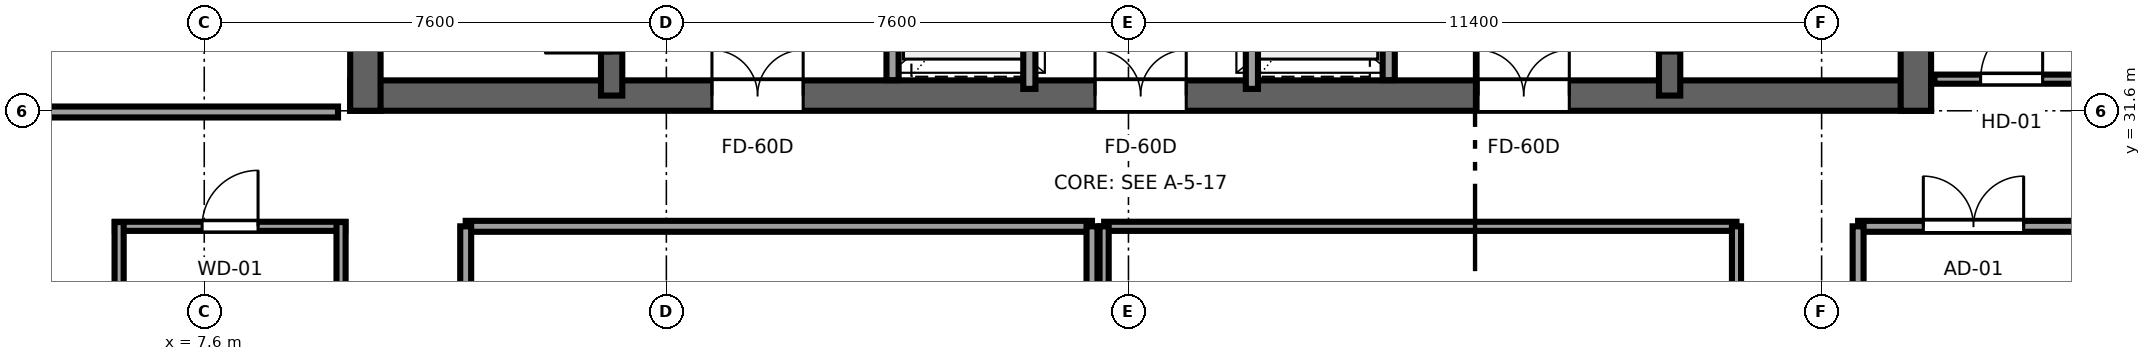
"""IFC4 building model, lengths in metres.
Left out: names, types, materials, properties, quantities, classifications, styles, units other than length and angle.
Written with IfcOpenShell. Run it as: python <this file> out.ifc"""

import sys

from ifc_helpers import new_model, si_unit, direction, frame, frame_2d, origin, place, context, subcontext, project, spatial, rectangle, extrude, source, transform, mapped, element, fill, save


model = new_model("IFC4")
c1 = context("Model", 3, precision=1e-05, world=origin(), true_north=direction((0.0, 1.0)))
c2 = subcontext(c1, "Body", "Model", "MODEL_VIEW")
j1 = project(units=[si_unit("LENGTHUNIT", "METRE"), si_unit("PLANEANGLEUNIT", "RADIAN")], contexts=[c1])
p1 = place(None, origin())
s1 = spatial("IfcSite", under=j1, at=p1, CompositionType="ELEMENT")
p2 = place(p1, origin())
s2 = spatial("IfcBuilding", under=s1, at=p2, CompositionType="ELEMENT")
p3 = place(p2, frame((0.0, 0.0, 241.65)))
s3 = spatial("IfcBuildingStorey", under=s2, at=p3, CompositionType="ELEMENT", Elevation=241.65)
p4 = place(p3, frame((10.0, 31.85, 0.0), z_axis=(0.0, 0.0, 1.0), x_axis=(1.0, 0.0, 0.0)))
e1 = element("IfcWall", 1, at=p4, inside=s3, PredefinedType="SHEAR", context=c2, shape_type="SweptSolid", body=[
    extrude(rectangle(XDim=26.0, YDim=0.5, at=frame_2d((13.0, 0.0))), origin(), (0.0, 0.0, 1.0), 3.55),
])
p5 = place(p4, frame((7.45, 0.0, 0.0), z_axis=(0.0, 0.0, 1.0), x_axis=(-1.0, 0.0, 0.0)))
e2 = element("IfcOpeningElement", 2, at=p5, cuts=e1, PredefinedType="OPENING", context=c2, shape_type="SweptSolid", body=[
    extrude(rectangle(XDim=1.5, YDim=2.04, at=frame_2d((0.75, 1.02))), frame((0.0, 0.26, 0.0), z_axis=(0.0, -1.0, 0.0), x_axis=(1.0, 0.0, 0.0)), (0.0, 0.0, 1.0), 0.52),
])
p6 = place(p4, frame((13.75, 0.0, 0.0), z_axis=(0.0, 0.0, 1.0), x_axis=(-1.0, 0.0, 0.0)))
e3 = element("IfcOpeningElement", 3, at=p6, cuts=e1, PredefinedType="OPENING", context=c2, shape_type="SweptSolid", body=[
    extrude(rectangle(XDim=1.5, YDim=2.04, at=frame_2d((0.75, 1.02))), frame((0.0, 0.26, 0.0), z_axis=(0.0, -1.0, 0.0), x_axis=(1.0, 0.0, 0.0)), (0.0, 0.0, 1.0), 0.52),
])
p7 = place(p4, frame((20.05, 0.0, 0.0), z_axis=(0.0, 0.0, 1.0), x_axis=(-1.0, 0.0, 0.0)))
e4 = element("IfcOpeningElement", 4, at=p7, cuts=e1, PredefinedType="OPENING", context=c2, shape_type="SweptSolid", body=[
    extrude(rectangle(XDim=1.5, YDim=2.04, at=frame_2d((0.75, 1.02))), frame((0.0, 0.26, 0.0), z_axis=(0.0, -1.0, 0.0), x_axis=(1.0, 0.0, 0.0)), (0.0, 0.0, 1.0), 0.52),
])
for number, where, z_axis, x_axis in (
    (5, (10.25, 31.6, 0.0), (0.0, 0.0, 1.0), (0.0, 1.0, 0.0)),
    (6, (35.75, 31.6, 0.0), (0.0, 0.0, 1.0), (0.0, 1.0, 0.0)),
):
    element("IfcWall", number, at=place(p3, frame(where, z_axis=z_axis, x_axis=x_axis)), inside=s3, PredefinedType="SHEAR", context=c2, shape_type="SweptSolid", body=[
        extrude(rectangle(XDim=13.6, YDim=0.5, at=frame_2d((6.8, 0.0))), origin(), (0.0, 0.0, 1.0), 3.55),
    ])
p8 = place(p3, frame((14.3, 31.85, 0.0), z_axis=(0.0, 0.0, 1.0), x_axis=(0.0, 1.0, 0.0)))
e7 = element("IfcWall", 7, at=p8, inside=s3, PredefinedType="SHEAR", context=c2, shape_type="SweptSolid", body=[
    extrude(rectangle(XDim=13.1, YDim=0.35, at=frame_2d((6.55, 0.0))), origin(), (0.0, 0.0, 1.0), 3.55),
])
p9 = place(p8, frame((0.7, 0.0, 0.0)))
e8 = element("IfcOpeningElement", 8, at=p9, cuts=e7, PredefinedType="OPENING", context=c2, shape_type="SweptSolid", body=[
    extrude(rectangle(XDim=1.1, YDim=2.12, at=frame_2d((0.55, 1.06))), frame((0.0, 0.185, 0.0), z_axis=(0.0, -1.0, 0.0), x_axis=(1.0, 0.0, 0.0)), (0.0, 0.0, 1.0), 0.37),
])
p10 = place(p3, frame((31.7, 31.85, 0.0), z_axis=(0.0, 0.0, 1.0), x_axis=(0.0, 1.0, 0.0)))
e9 = element("IfcWall", 9, at=p10, inside=s3, PredefinedType="SHEAR", context=c2, shape_type="SweptSolid", body=[
    extrude(rectangle(XDim=13.1, YDim=0.35, at=frame_2d((6.55, 0.0))), origin(), (0.0, 0.0, 1.0), 3.55),
])
p11 = place(p10, frame((1.8, 0.0, 0.0), z_axis=(0.0, 0.0, 1.0), x_axis=(-1.0, 0.0, 0.0)))
e10 = element("IfcOpeningElement", 10, at=p11, cuts=e9, PredefinedType="OPENING", context=c2, shape_type="SweptSolid", body=[
    extrude(rectangle(XDim=1.1, YDim=2.12, at=frame_2d((0.55, 1.06))), frame((0.0, 0.185, 0.0), z_axis=(0.0, -1.0, 0.0), x_axis=(1.0, 0.0, 0.0)), (0.0, 0.0, 1.0), 0.37),
])
for number, where, z_axis, x_axis in (
    (11, (18.92, 32.104, 0.0), (0.0, 0.0, 1.0), (0.0, 1.0, 0.0)),
    (12, (27.08, 32.104, 0.0), (0.0, 0.0, 1.0), (0.0, 1.0, 0.0)),
):
    element("IfcWall", number, at=place(p3, frame(where, z_axis=z_axis, x_axis=x_axis)), inside=s3, PredefinedType="SOLIDWALL", context=c2, shape_type="SweptSolid", body=[
        extrude(rectangle(XDim=4.046, YDim=0.2, at=frame_2d((2.023, 0.0))), origin(), (0.0, 0.0, 1.0), 3.37),
    ])
p12 = place(p3, frame((21.17, 31.96, 0.0), z_axis=(0.0, 0.0, 1.0), x_axis=(0.0, 1.0, 0.0)))
e13 = element("IfcWall", 13, at=p12, inside=s3, PredefinedType="SOLIDWALL", context=c2, shape_type="SweptSolid", body=[
    extrude(rectangle(XDim=5.08, YDim=0.2, at=frame_2d((2.54, 0.0))), origin(), (0.0, 0.0, 1.0), 3.37),
])
p13 = place(p12, frame((0.74, 0.0, 0.0)))
e14 = element("IfcOpeningElement", 14, at=p13, cuts=e13, PredefinedType="OPENING", context=c2, shape_type="SweptSolid", body=[
    extrude(rectangle(XDim=1.1, YDim=2.12, at=frame_2d((0.55, 1.06))), frame((0.0, 0.11, 0.0), z_axis=(0.0, -1.0, 0.0), x_axis=(1.0, 0.0, 0.0)), (0.0, 0.0, 1.0), 0.22),
])
p14 = place(p12, frame((3.24, 0.0, 0.0)))
e15 = element("IfcOpeningElement", 15, at=p14, cuts=e13, PredefinedType="OPENING", context=c2, shape_type="SweptSolid", body=[
    extrude(rectangle(XDim=1.1, YDim=2.12, at=frame_2d((0.55, 1.06))), frame((0.0, 0.11, 0.0), z_axis=(0.0, -1.0, 0.0), x_axis=(1.0, 0.0, 0.0)), (0.0, 0.0, 1.0), 0.22),
])
p15 = place(p3, frame((24.83, 31.96, 0.0), z_axis=(0.0, 0.0, 1.0), x_axis=(0.0, 1.0, 0.0)))
e16 = element("IfcWall", 16, at=p15, inside=s3, PredefinedType="SOLIDWALL", context=c2, shape_type="SweptSolid", body=[
    extrude(rectangle(XDim=5.08, YDim=0.2, at=frame_2d((2.54, 0.0))), origin(), (0.0, 0.0, 1.0), 3.37),
])
p16 = place(p15, frame((0.74, 0.0, 0.0)))
e17 = element("IfcOpeningElement", 17, at=p16, cuts=e16, PredefinedType="OPENING", context=c2, shape_type="SweptSolid", body=[
    extrude(rectangle(XDim=1.1, YDim=2.12, at=frame_2d((0.55, 1.06))), frame((0.0, 0.11, 0.0), z_axis=(0.0, -1.0, 0.0), x_axis=(1.0, 0.0, 0.0)), (0.0, 0.0, 1.0), 0.22),
])
p17 = place(p15, frame((3.24, 0.0, 0.0)))
e18 = element("IfcOpeningElement", 18, at=p17, cuts=e16, PredefinedType="OPENING", context=c2, shape_type="SweptSolid", body=[
    extrude(rectangle(XDim=1.1, YDim=2.12, at=frame_2d((0.55, 1.06))), frame((0.0, 0.11, 0.0), z_axis=(0.0, -1.0, 0.0), x_axis=(1.0, 0.0, 0.0)), (0.0, 0.0, 1.0), 0.22),
])
p18 = place(p3, frame((11.9, 29.7, 0.0), z_axis=(0.0, 0.0, 1.0), x_axis=(1.0, 0.0, 0.0)))
e19 = element("IfcWall", 19, at=p18, inside=s3, PredefinedType="PARTITIONING", context=c2, shape_type="SweptSolid", body=[
    extrude(rectangle(XDim=10.3, YDim=0.18, at=frame_2d((5.15, 0.0))), origin(), (0.0, 0.0, 1.0), 3.37),
])
p19 = place(p3, frame((11.9, 21.55, 0.0), z_axis=(0.0, 0.0, 1.0), x_axis=(0.0, 1.0, 0.0)))
e20 = element("IfcWall", 20, at=p19, inside=s3, PredefinedType="PARTITIONING", context=c2, shape_type="SweptSolid", body=[
    extrude(rectangle(XDim=8.15, YDim=0.18, at=frame_2d((4.075, 0.0))), origin(), (0.0, 0.0, 1.0), 3.37),
])
p20 = place(p3, frame((22.2, 21.55, 0.0), z_axis=(0.0, 0.0, 1.0), x_axis=(0.0, 1.0, 0.0)))
e21 = element("IfcWall", 21, at=p20, inside=s3, PredefinedType="PARTITIONING", context=c2, shape_type="SweptSolid", body=[
    extrude(rectangle(XDim=8.15, YDim=0.18, at=frame_2d((4.075, 0.0))), origin(), (0.0, 0.0, 1.0), 2.16),
])
p21 = place(p3, frame((22.4, 29.7, 0.0), z_axis=(0.0, 0.0, 1.0), x_axis=(1.0, 0.0, 0.0)))
e22 = element("IfcWall", 22, at=p21, inside=s3, PredefinedType="PARTITIONING", context=c2, shape_type="SweptSolid", body=[
    extrude(rectangle(XDim=10.4, YDim=0.15, at=frame_2d((5.2, 0.0))), origin(), (0.0, 0.0, 1.0), 3.37),
])
p22 = place(p3, frame((22.4, 21.55, 0.0), z_axis=(0.0, 0.0, 1.0), x_axis=(0.0, 1.0, 0.0)))
e23 = element("IfcWall", 23, at=p22, inside=s3, PredefinedType="PARTITIONING", context=c2, shape_type="SweptSolid", body=[
    extrude(rectangle(XDim=8.15, YDim=0.15, at=frame_2d((4.075, 0.0))), origin(), (0.0, 0.0, 1.0), 3.37),
])
p23 = place(p3, frame((32.8, 21.55, 0.0), z_axis=(0.0, 0.0, 1.0), x_axis=(0.0, 1.0, 0.0)))
e24 = element("IfcWall", 24, at=p23, inside=s3, PredefinedType="PARTITIONING", context=c2, shape_type="SweptSolid", body=[
    extrude(rectangle(XDim=8.15, YDim=0.15, at=frame_2d((4.075, 0.0))), origin(), (0.0, 0.0, 1.0), 2.16),
])
p24 = place(p3, frame((6.13, 29.7, 0.0), z_axis=(0.0, 0.0, 1.0), x_axis=(1.0, 0.0, 0.0)))
e25 = element("IfcWall", 25, at=p24, inside=s3, PredefinedType="PARTITIONING", context=c2, shape_type="SweptSolid", body=[
    extrude(rectangle(XDim=3.79, YDim=0.15, at=frame_2d((1.895, 0.0))), origin(), (0.0, 0.0, 1.0), 3.37),
])
p25 = place(p24, frame((1.435, 0.0, 0.0)))
e26 = element("IfcOpeningElement", 26, at=p25, cuts=e25, PredefinedType="OPENING", context=c2, shape_type="SweptSolid", body=[
    extrude(rectangle(XDim=0.92, YDim=2.01, at=frame_2d((0.46, 1.005))), frame((0.0, 0.085, 0.0), z_axis=(0.0, -1.0, 0.0), x_axis=(1.0, 0.0, 0.0)), (0.0, 0.0, 1.0), 0.17),
])
for number, where, z_axis, x_axis in (
    (27, (6.2, 26.43, 0.0), (0.0, 0.0, 1.0), (0.0, 1.0, 0.0)),
    (28, (9.85, 26.43, 0.0), (0.0, 0.0, 1.0), (0.0, 1.0, 0.0)),
):
    element("IfcWall", number, at=place(p3, frame(where, z_axis=z_axis, x_axis=x_axis)), inside=s3, PredefinedType="PARTITIONING", context=c2, shape_type="SweptSolid", body=[
        extrude(rectangle(XDim=3.34, YDim=0.15, at=frame_2d((1.67, 0.0))), origin(), (0.0, 0.0, 1.0), 3.37),
    ])
p26 = place(p3, frame((3.005, 31.58, 0.0), z_axis=(0.0, 0.0, 1.0), x_axis=(1.0, 0.0, 0.0)))
e29 = element("IfcWall", 29, at=p26, inside=s3, PredefinedType="PARTITIONING", context=c2, shape_type="SweptSolid", body=[
    extrude(rectangle(XDim=6.795, YDim=0.18, at=frame_2d((3.397, 0.0))), origin(), (0.0, 0.0, 1.0), 3.37),
])
p27 = place(p26, frame((0.285, 0.0, 0.0)))
e30 = element("IfcOpeningElement", 30, at=p27, cuts=e29, PredefinedType="OPENING", context=c2, shape_type="SweptSolid", body=[
    extrude(rectangle(XDim=0.98, YDim=2.12, at=frame_2d((0.49, 1.06))), frame((0.0, 0.1, 0.0), z_axis=(0.0, -1.0, 0.0), x_axis=(1.0, 0.0, 0.0)), (0.0, 0.0, 1.0), 0.2),
])
p28 = place(p3, frame((36.055, 32.12, 0.0), z_axis=(0.0, 0.0, 1.0), x_axis=(1.0, 0.0, 0.0)))
e31 = element("IfcWall", 31, at=p28, inside=s3, PredefinedType="PARTITIONING", context=c2, shape_type="SweptSolid", body=[
    extrude(rectangle(XDim=2.54, YDim=0.15, at=frame_2d((1.27, 0.0))), origin(), (0.0, 0.0, 1.0), 3.37),
])
p29 = place(p28, frame((0.76, 0.0, 0.0)))
e32 = element("IfcOpeningElement", 32, at=p29, cuts=e31, PredefinedType="OPENING", context=c2, shape_type="SweptSolid", body=[
    extrude(rectangle(XDim=1.02, YDim=2.03, at=frame_2d((0.51, 1.015))), frame((0.0, 0.085, 0.0), z_axis=(0.0, -1.0, 0.0), x_axis=(1.0, 0.0, 0.0)), (0.0, 0.0, 1.0), 0.17),
])
p30 = place(p3, frame((34.8, 29.7, 0.0), z_axis=(0.0, 0.0, 1.0), x_axis=(1.0, 0.0, 0.0)))
e33 = element("IfcWall", 33, at=p30, inside=s3, PredefinedType="PARTITIONING", context=c2, shape_type="SweptSolid", body=[
    extrude(rectangle(XDim=3.795, YDim=0.18, at=frame_2d((1.897, 0.0))), origin(), (0.0, 0.0, 1.0), 3.37),
])
p31 = place(p30, frame((1.073, 0.0, 0.0)))
e34 = element("IfcOpeningElement", 34, at=p31, cuts=e33, PredefinedType="OPENING", context=c2, shape_type="SweptSolid", body=[
    extrude(rectangle(XDim=1.65, YDim=2.15, at=frame_2d((0.825, 1.075))), frame((0.0, 0.1, 0.0), z_axis=(0.0, -1.0, 0.0), x_axis=(1.0, 0.0, 0.0)), (0.0, 0.0, 1.0), 0.2),
])
p32 = place(p3, frame((34.8, 21.9, 0.0), z_axis=(0.0, 0.0, 1.0), x_axis=(0.0, 1.0, 0.0)))
e35 = element("IfcWall", 35, at=p32, inside=s3, PredefinedType="PARTITIONING", context=c2, shape_type="SweptSolid", body=[
    extrude(rectangle(XDim=7.8, YDim=0.18, at=frame_2d((3.9, 0.0))), origin(), (0.0, 0.0, 1.0), 2.16),
])
m1 = source(origin(), c2, "Body", "SweptSolid", [
    extrude(rectangle(XDim=1.1, YDim=2.12, at=frame_2d((0.55, 1.06))), frame((0.0, 0.025, 0.0), z_axis=(0.0, -1.0, 0.0), x_axis=(1.0, 0.0, 0.0)), (0.0, 0.0, 1.0), 0.05),
])
p33 = place(p9, origin())
e36 = element("IfcDoor", 36, at=p33, inside=s3, OperationType="SINGLE_SWING_LEFT", PredefinedType="DOOR", context=c2, shape_type="MappedRepresentation", body=[
    mapped(m1, transform((0.0, 0.0, 0.0), x_axis=(1.0, 0.0, 0.0), y_axis=(0.0, 1.0, 0.0), z_axis=(0.0, 0.0, 1.0), scale=1.0)),
])
fill(e8, e36)
p34 = place(p11, origin())
e37 = element("IfcDoor", 37, at=p34, inside=s3, OperationType="SINGLE_SWING_RIGHT", PredefinedType="DOOR", context=c2, shape_type="MappedRepresentation", body=[
    mapped(m1, transform((0.0, 0.0, 0.0), x_axis=(1.0, 0.0, 0.0), y_axis=(0.0, 1.0, 0.0), z_axis=(0.0, 0.0, 1.0), scale=1.0)),
])
fill(e10, e37)
m2 = source(origin(), c2, "Body", "SweptSolid", [
    extrude(rectangle(XDim=1.5, YDim=2.04, at=frame_2d((0.75, 1.02))), frame((0.0, 0.025, 0.0), z_axis=(0.0, -1.0, 0.0), x_axis=(1.0, 0.0, 0.0)), (0.0, 0.0, 1.0), 0.05),
])
p35 = place(p5, origin())
e38 = element("IfcDoor", 38, at=p35, inside=s3, OperationType="DOUBLE_DOOR_SINGLE_SWING", PredefinedType="DOOR", context=c2, shape_type="MappedRepresentation", body=[
    mapped(m2, transform((0.0, 0.0, 0.0), x_axis=(1.0, 0.0, 0.0), y_axis=(0.0, 1.0, 0.0), z_axis=(0.0, 0.0, 1.0), scale=1.0)),
])
fill(e2, e38)
p36 = place(p6, origin())
e39 = element("IfcDoor", 39, at=p36, inside=s3, OperationType="DOUBLE_DOOR_SINGLE_SWING", PredefinedType="DOOR", context=c2, shape_type="MappedRepresentation", body=[
    mapped(m2, transform((0.0, 0.0, 0.0), x_axis=(1.0, 0.0, 0.0), y_axis=(0.0, 1.0, 0.0), z_axis=(0.0, 0.0, 1.0), scale=1.0)),
])
fill(e3, e39)
p37 = place(p7, origin())
e40 = element("IfcDoor", 40, at=p37, inside=s3, OperationType="DOUBLE_DOOR_SINGLE_SWING", PredefinedType="DOOR", context=c2, shape_type="MappedRepresentation", body=[
    mapped(m2, transform((0.0, 0.0, 0.0), x_axis=(1.0, 0.0, 0.0), y_axis=(0.0, 1.0, 0.0), z_axis=(0.0, 0.0, 1.0), scale=1.0)),
])
fill(e4, e40)
m3 = source(origin(), c2, "Body", "SweptSolid", [
    extrude(rectangle(XDim=0.92, YDim=2.01, at=frame_2d((0.46, 1.005))), frame((0.0, 0.025, 0.0), z_axis=(0.0, -1.0, 0.0), x_axis=(1.0, 0.0, 0.0)), (0.0, 0.0, 1.0), 0.05),
])
p38 = place(p25, origin())
e41 = element("IfcDoor", 41, at=p38, inside=s3, OperationType="SINGLE_SWING_RIGHT", PredefinedType="DOOR", context=c2, shape_type="MappedRepresentation", body=[
    mapped(m3, transform((0.0, 0.0, 0.0), x_axis=(1.0, 0.0, 0.0), y_axis=(0.0, 1.0, 0.0), z_axis=(0.0, 0.0, 1.0), scale=1.0)),
])
fill(e26, e41)
m4 = source(origin(), c2, "Body", "SweptSolid", [
    extrude(rectangle(XDim=1.02, YDim=2.03, at=frame_2d((0.51, 1.015))), frame((0.0, 0.025, 0.0), z_axis=(0.0, -1.0, 0.0), x_axis=(1.0, 0.0, 0.0)), (0.0, 0.0, 1.0), 0.05),
])
p39 = place(p29, origin())
e42 = element("IfcDoor", 42, at=p39, inside=s3, OperationType="SINGLE_SWING_RIGHT", PredefinedType="DOOR", context=c2, shape_type="MappedRepresentation", body=[
    mapped(m4, transform((0.0, 0.0, 0.0), x_axis=(1.0, 0.0, 0.0), y_axis=(0.0, 1.0, 0.0), z_axis=(0.0, 0.0, 1.0), scale=1.0)),
])
fill(e32, e42)
m5 = source(origin(), c2, "Body", "SweptSolid", [
    extrude(rectangle(XDim=1.65, YDim=2.15, at=frame_2d((0.825, 1.075))), frame((0.0, 0.025, 0.0), z_axis=(0.0, -1.0, 0.0), x_axis=(1.0, 0.0, 0.0)), (0.0, 0.0, 1.0), 0.05),
])
p40 = place(p31, origin())
e43 = element("IfcDoor", 43, at=p40, inside=s3, OperationType="DOUBLE_DOOR_SINGLE_SWING", PredefinedType="DOOR", context=c2, shape_type="MappedRepresentation", body=[
    mapped(m5, transform((0.0, 0.0, 0.0), x_axis=(1.0, 0.0, 0.0), y_axis=(0.0, 1.0, 0.0), z_axis=(0.0, 0.0, 1.0), scale=1.0)),
])
fill(e34, e43)
save(model, sys.argv[1])
